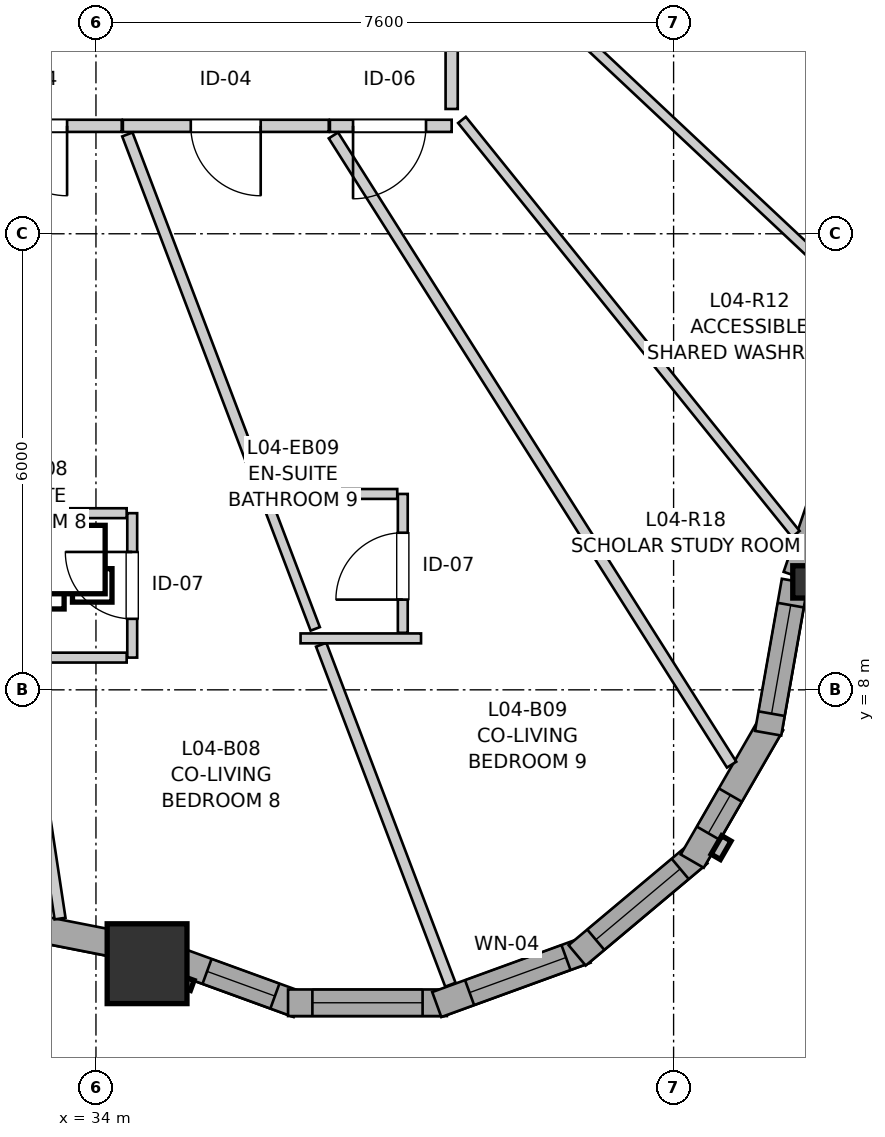
"""IFC4 building model, lengths in metres.
Left out: names, types, materials, properties, quantities, classifications, styles, units other than length and angle.
Written with IfcOpenShell. Run it as: python <this file> out.ifc"""

import sys

from ifc_helpers import new_model, si_unit, direction, frame, frame_2d, origin, origin_2d, place, context, subcontext, project, spatial, rectangle, i_section, extrude, source, transform, mapped, element, fill, save


model = new_model("IFC4")
c1 = context("Model", 3, precision=1e-05, world=origin(), true_north=direction((0.0, 1.0)))
c2 = subcontext(c1, "Body", "Model", "MODEL_VIEW")
j1 = project(units=[si_unit("LENGTHUNIT", "METRE"), si_unit("PLANEANGLEUNIT", "RADIAN")], contexts=[c1])
p1 = place(None, origin())
s1 = spatial("IfcSite", under=j1, at=p1, CompositionType="ELEMENT")
p2 = place(p1, origin())
s2 = spatial("IfcBuilding", under=s1, at=p2, CompositionType="ELEMENT")
p3 = place(p2, frame((0.0, 0.0, 17.4)))
s3 = spatial("IfcBuildingStorey", under=s2, at=p3, CompositionType="ELEMENT", Elevation=17.4)
m1 = source(origin(), c2, "Body", "SweptSolid", [
    extrude(rectangle(XDim=1.05, YDim=1.05, at=origin_2d()), origin(), (0.0, 0.0, 1.0), 2.94),
])
p4 = place(p3, frame((34.673, 4.397, 0.0), z_axis=(0.0, 0.0, 1.0), x_axis=(1.0, 0.0, 0.0)))
e1 = element("IfcColumn", 1, at=p4, inside=s3, PredefinedType="COLUMN", context=c2, shape_type="MappedRepresentation", body=[
    mapped(m1, transform((0.0, 0.0, 0.0), x_axis=(1.0, 0.0, 0.0), y_axis=(0.0, 1.0, 0.0), z_axis=(0.0, 0.0, 1.0), scale=1.0)),
])
m2 = source(origin(), c2, "Body", "SweptSolid", [
    extrude(i_section(OverallWidth=0.409, OverallDepth=0.425, WebThickness=0.03, FlangeThickness=0.048, FilletRadius=0.015, at=origin_2d()), origin(), (0.0, 0.0, 1.0), 2.94),
])
p5 = place(p3, frame((43.373, 9.42, 0.0), z_axis=(0.0, 0.0, 1.0), x_axis=(1.0, 0.0, 0.0)))
e2 = element("IfcColumn", 2, at=p5, inside=s3, PredefinedType="PILASTER", context=c2, shape_type="MappedRepresentation", body=[
    mapped(m2, transform((0.0, 0.0, 0.0), x_axis=(1.0, 0.0, 0.0), y_axis=(0.0, 1.0, 0.0), z_axis=(0.0, 0.0, 1.0), scale=1.0)),
])
p6 = place(p3, frame((31.23, 5.252, 0.0), z_axis=(0.0, 0.0, 1.0), x_axis=(0.981232542219, -0.192828156892, 0.0)))
e3 = element("IfcWall", 3, at=p6, inside=s3, PredefinedType="SOLIDWALL", context=c2, shape_type="SweptSolid", body=[
    extrude(rectangle(XDim=3.242, YDim=0.35, at=frame_2d((1.621, 0.0))), origin(), (0.0, 0.0, 1.0), 2.42),
])
p7 = place(p6, frame((0.471, 0.0, 0.82)))
e4 = element("IfcOpeningElement", 4, at=p7, cuts=e3, PredefinedType="OPENING", context=c2, shape_type="SweptSolid", body=[
    extrude(rectangle(XDim=1.45, YDim=1.25, at=frame_2d((0.725, 0.625))), frame((0.0, 0.185, 0.0), z_axis=(0.0, -1.0, 0.0), x_axis=(1.0, 0.0, 0.0)), (0.0, 0.0, 1.0), 0.37),
])
p8 = place(p3, frame((35.014, 4.459, 0.0), z_axis=(0.0, 0.0, 1.0), x_axis=(0.939720171257, -0.341944439541, 0.0)))
e5 = element("IfcWall", 5, at=p8, inside=s3, PredefinedType="SOLIDWALL", context=c2, shape_type="SweptSolid", body=[
    extrude(rectangle(XDim=1.752, YDim=0.35, at=frame_2d((0.876, 0.0))), origin(), (0.0, 0.0, 1.0), 2.42),
])
p9 = place(p8, frame((0.476, 0.0, 0.82)))
e6 = element("IfcOpeningElement", 6, at=p9, cuts=e5, PredefinedType="OPENING", context=c2, shape_type="SweptSolid", body=[
    extrude(rectangle(XDim=0.95, YDim=1.35, at=frame_2d((0.475, 0.675))), frame((0.0, 0.185, 0.0), z_axis=(0.0, -1.0, 0.0), x_axis=(1.0, 0.0, 0.0)), (0.0, 0.0, 1.0), 0.37),
])
p10 = place(p3, frame((36.527, 3.883, 0.0), z_axis=(0.0, 0.0, 1.0), x_axis=(1.0, 0.0, 0.0)))
e7 = element("IfcWall", 7, at=p10, inside=s3, PredefinedType="SOLIDWALL", context=c2, shape_type="SweptSolid", body=[
    extrude(rectangle(XDim=2.09, YDim=0.35, at=frame_2d((1.045, 0.0))), origin(), (0.0, 0.0, 1.0), 2.42),
])
p11 = place(p10, frame((0.32, 0.0, 0.82)))
e8 = element("IfcOpeningElement", 8, at=p11, cuts=e7, PredefinedType="OPENING", context=c2, shape_type="SweptSolid", body=[
    extrude(rectangle(XDim=1.45, YDim=1.25, at=frame_2d((0.725, 0.625))), frame((0.0, 0.185, 0.0), z_axis=(0.0, -1.0, 0.0), x_axis=(1.0, 0.0, 0.0)), (0.0, 0.0, 1.0), 0.37),
])
p12 = place(p3, frame((38.484, 3.86, 0.0), z_axis=(0.0, 0.0, 1.0), x_axis=(0.939711556618, 0.341968113072, 0.0)))
e9 = element("IfcWall", 9, at=p12, inside=s3, PredefinedType="SOLIDWALL", context=c2, shape_type="SweptSolid", body=[
    extrude(rectangle(XDim=2.09, YDim=0.35, at=frame_2d((1.045, 0.0))), origin(), (0.0, 0.0, 1.0), 2.42),
])
p13 = place(p12, frame((0.459, 0.0, 0.82)))
e10 = element("IfcOpeningElement", 10, at=p13, cuts=e9, PredefinedType="OPENING", context=c2, shape_type="SweptSolid", body=[
    extrude(rectangle(XDim=1.35, YDim=1.45, at=frame_2d((0.675, 0.725))), frame((0.0, 0.185, 0.0), z_axis=(0.0, -1.0, 0.0), x_axis=(1.0, 0.0, 0.0)), (0.0, 0.0, 1.0), 0.37),
])
p14 = place(p3, frame((40.331, 4.507, 0.0), z_axis=(0.0, 0.0, 1.0), x_axis=(0.766024572719, 0.642811289563, 0.0)))
e11 = element("IfcWall", 11, at=p14, inside=s3, PredefinedType="SOLIDWALL", context=c2, shape_type="SweptSolid", body=[
    extrude(rectangle(XDim=2.09, YDim=0.35, at=frame_2d((1.045, 0.0))), origin(), (0.0, 0.0, 1.0), 2.42),
])
p15 = place(p14, frame((0.32, 0.0, 0.82)))
e12 = element("IfcOpeningElement", 12, at=p15, cuts=e11, PredefinedType="OPENING", context=c2, shape_type="SweptSolid", body=[
    extrude(rectangle(XDim=1.45, YDim=1.25, at=frame_2d((0.725, 0.625))), frame((0.0, 0.185, 0.0), z_axis=(0.0, -1.0, 0.0), x_axis=(1.0, 0.0, 0.0)), (0.0, 0.0, 1.0), 0.37),
])
p16 = place(p3, frame((41.845, 5.746, 0.0), z_axis=(0.0, 0.0, 1.0), x_axis=(0.499995423472, 0.866028046028, 0.0)))
e13 = element("IfcWall", 13, at=p16, inside=s3, PredefinedType="SOLIDWALL", context=c2, shape_type="SweptSolid", body=[
    extrude(rectangle(XDim=2.09, YDim=0.35, at=frame_2d((1.045, 0.0))), origin(), (0.0, 0.0, 1.0), 2.42),
])
p17 = place(p16, frame((0.424, 0.0, 0.82)))
e14 = element("IfcOpeningElement", 14, at=p17, cuts=e13, PredefinedType="OPENING", context=c2, shape_type="SweptSolid", body=[
    extrude(rectangle(XDim=0.58, YDim=1.35, at=frame_2d((0.29, 0.675))), frame((0.0, 0.185, 0.0), z_axis=(0.0, -1.0, 0.0), x_axis=(1.0, 0.0, 0.0)), (0.0, 0.0, 1.0), 0.37),
])
p18 = place(p3, frame((42.844, 7.429, 0.0), z_axis=(0.0, 0.0, 1.0), x_axis=(0.17370309897, 0.984798067326, 0.0)))
e15 = element("IfcWall", 15, at=p18, inside=s3, PredefinedType="SOLIDWALL", context=c2, shape_type="SweptSolid", body=[
    extrude(rectangle(XDim=2.032, YDim=0.35, at=frame_2d((1.016, 0.0))), origin(), (0.0, 0.0, 1.0), 2.42),
])
p19 = place(p18, frame((0.261, 0.0, 0.82)))
e16 = element("IfcOpeningElement", 16, at=p19, cuts=e15, PredefinedType="OPENING", context=c2, shape_type="SweptSolid", body=[
    extrude(rectangle(XDim=1.45, YDim=1.25, at=frame_2d((0.725, 0.625))), frame((0.0, 0.185, 0.0), z_axis=(0.0, -1.0, 0.0), x_axis=(1.0, 0.0, 0.0)), (0.0, 0.0, 1.0), 0.37),
])
p20 = place(p3, frame((43.213, 9.496, 0.0), z_axis=(0.0, 0.0, 1.0), x_axis=(0.323599506414, 0.946194144692, 0.0)))
e17 = element("IfcWall", 17, at=p20, inside=s3, PredefinedType="SOLIDWALL", context=c2, shape_type="SweptSolid", body=[
    extrude(rectangle(XDim=3.522, YDim=0.35, at=frame_2d((1.761, 0.0))), origin(), (0.0, 0.0, 1.0), 2.42),
])
p21 = place(p20, frame((1.351, 0.0, 0.82)))
e18 = element("IfcOpeningElement", 18, at=p21, cuts=e17, PredefinedType="OPENING", context=c2, shape_type="SweptSolid", body=[
    extrude(rectangle(XDim=1.25, YDim=1.35, at=frame_2d((0.625, 0.675))), frame((0.0, 0.185, 0.0), z_axis=(0.0, -1.0, 0.0), x_axis=(1.0, 0.0, 0.0)), (0.0, 0.0, 1.0), 0.37),
])
p22 = place(p3, frame((37.063, 15.42, 0.0), z_axis=(0.0, 0.0, 1.0), x_axis=(-1.0, 0.0, 0.0)))
e19 = element("IfcWall", 19, at=p22, inside=s3, PredefinedType="PARTITIONING", context=c2, shape_type="SweptSolid", body=[
    extrude(rectangle(XDim=2.709, YDim=0.16, at=frame_2d((1.354, 0.0))), origin(), (0.0, 0.0, 1.0), 2.94),
])
p23 = place(p22, frame((0.896, 0.0, 0.0)))
e20 = element("IfcOpeningElement", 20, at=p23, cuts=e19, PredefinedType="OPENING", context=c2, shape_type="SweptSolid", body=[
    extrude(rectangle(XDim=0.92, YDim=2.1, at=frame_2d((0.46, 1.05))), frame((0.0, 0.09, 0.0), z_axis=(0.0, -1.0, 0.0), x_axis=(1.0, 0.0, 0.0)), (0.0, 0.0, 1.0), 0.18),
])
p24 = place(p3, frame((38.68, 18.147, 0.0), z_axis=(0.0, 0.0, 1.0), x_axis=(0.0, -1.0, 0.0)))
e21 = element("IfcWall", 21, at=p24, inside=s3, PredefinedType="PARTITIONING", context=c2, shape_type="SweptSolid", body=[
    extrude(rectangle(XDim=2.505, YDim=0.16, at=frame_2d((1.252, 0.0))), origin(), (0.0, 0.0, 1.0), 2.94),
])
p25 = place(p24, frame((0.748, 0.0, 0.0)))
e22 = element("IfcOpeningElement", 22, at=p25, cuts=e21, PredefinedType="OPENING", context=c2, shape_type="SweptSolid", body=[
    extrude(rectangle(XDim=0.95, YDim=2.1, at=frame_2d((0.475, 1.05))), frame((0.0, 0.09, 0.0), z_axis=(0.0, -1.0, 0.0), x_axis=(1.0, 0.0, 0.0)), (0.0, 0.0, 1.0), 0.18),
])
p26 = place(p3, frame((34.339, 15.42, 0.0), z_axis=(0.0, 0.0, 1.0), x_axis=(-1.0, 0.0, 0.0)))
e23 = element("IfcWall", 23, at=p26, inside=s3, PredefinedType="PARTITIONING", context=c2, shape_type="SweptSolid", body=[
    extrude(rectangle(XDim=2.359, YDim=0.16, at=frame_2d((1.18, 0.0))), origin(), (0.0, 0.0, 1.0), 2.94),
])
p27 = place(p26, frame((0.719, 0.0, 0.0)))
e24 = element("IfcOpeningElement", 24, at=p27, cuts=e23, PredefinedType="OPENING", context=c2, shape_type="SweptSolid", body=[
    extrude(rectangle(XDim=0.92, YDim=2.1, at=frame_2d((0.46, 1.05))), frame((0.0, 0.09, 0.0), z_axis=(0.0, -1.0, 0.0), x_axis=(1.0, 0.0, 0.0)), (0.0, 0.0, 1.0), 0.18),
])
p28 = place(p3, frame((34.477, 8.424, 0.0), z_axis=(0.0, 0.0, 1.0), x_axis=(0.0, 1.0, 0.0)))
e25 = element("IfcWall", 25, at=p28, inside=s3, PredefinedType="PARTITIONING", context=c2, shape_type="SweptSolid", body=[
    extrude(rectangle(XDim=1.9, YDim=0.13, at=frame_2d((0.95, 0.0))), origin(), (0.0, 0.0, 1.0), 2.94),
])
p29 = place(p28, frame((0.51, 0.0, 0.0)))
e26 = element("IfcOpeningElement", 26, at=p29, cuts=e25, PredefinedType="OPENING", context=c2, shape_type="SweptSolid", body=[
    extrude(rectangle(XDim=0.88, YDim=2.05, at=frame_2d((0.44, 1.025))), frame((0.0, 0.075, 0.0), z_axis=(0.0, -1.0, 0.0), x_axis=(1.0, 0.0, 0.0)), (0.0, 0.0, 1.0), 0.15),
])
p30 = place(p3, frame((38.037, 8.75, 0.0), z_axis=(0.0, 0.0, 1.0), x_axis=(0.0, 1.0, 0.0)))
e27 = element("IfcWall", 27, at=p30, inside=s3, PredefinedType="PARTITIONING", context=c2, shape_type="SweptSolid", body=[
    extrude(rectangle(XDim=1.827, YDim=0.13, at=frame_2d((0.914, 0.0))), origin(), (0.0, 0.0, 1.0), 2.94),
])
p31 = place(p30, frame((0.437, 0.0, 0.0)))
e28 = element("IfcOpeningElement", 28, at=p31, cuts=e27, PredefinedType="OPENING", context=c2, shape_type="SweptSolid", body=[
    extrude(rectangle(XDim=0.88, YDim=2.05, at=frame_2d((0.44, 1.025))), frame((0.0, 0.075, 0.0), z_axis=(0.0, -1.0, 0.0), x_axis=(1.0, 0.0, 0.0)), (0.0, 0.0, 1.0), 0.15),
])
p32 = place(p3, frame((38.68, 15.42, 0.0), z_axis=(0.0, 0.0, 1.0), x_axis=(-1.0, 0.0, 0.0)))
e29 = element("IfcWall", 29, at=p32, inside=s3, PredefinedType="PARTITIONING", context=c2, shape_type="SweptSolid", body=[
    extrude(rectangle(XDim=1.602, YDim=0.16, at=frame_2d((0.801, 0.0))), origin(), (0.0, 0.0, 1.0), 2.94),
])
p33 = place(p32, frame((0.337, 0.0, 0.0)))
e30 = element("IfcOpeningElement", 30, at=p33, cuts=e29, PredefinedType="OPENING", context=c2, shape_type="SweptSolid", body=[
    extrude(rectangle(XDim=0.96, YDim=2.1, at=frame_2d((0.48, 1.05))), frame((0.0, 0.09, 0.0), z_axis=(0.0, -1.0, 0.0), x_axis=(1.0, 0.0, 0.0)), (0.0, 0.0, 1.0), 0.18),
])
p34 = place(p3, frame((37.125, 15.294, 0.0), z_axis=(0.0, 0.0, 1.0), x_axis=(0.534743765269, -0.845014263492, 0.0)))
e31 = element("IfcWall", 31, at=p34, inside=s3, PredefinedType="PARTITIONING", context=c2, shape_type="SweptSolid", body=[
    extrude(rectangle(XDim=9.797, YDim=0.145, at=frame_2d((4.899, 0.0))), origin(), (0.0, 0.0, 1.0), 2.94),
])
p35 = place(p3, frame((38.81, 18.061, 0.0), z_axis=(0.0, 0.0, 1.0), x_axis=(0.729196389153, -0.684304483433, 0.0)))
e32 = element("IfcWall", 32, at=p35, inside=s3, PredefinedType="PARTITIONING", context=c2, shape_type="SweptSolid", body=[
    extrude(rectangle(XDim=7.396, YDim=0.13, at=frame_2d((3.698, 0.0))), origin(), (0.0, 0.0, 1.0), 2.94),
])
p36 = place(p3, frame((38.816, 15.498, 0.0), z_axis=(0.0, 0.0, 1.0), x_axis=(0.627528755525, -0.778593386171, 0.0)))
e33 = element("IfcWall", 33, at=p36, inside=s3, PredefinedType="PARTITIONING", context=c2, shape_type="SweptSolid", body=[
    extrude(rectangle(XDim=6.998, YDim=0.13, at=frame_2d((3.499, 0.0))), origin(), (0.0, 0.0, 1.0), 2.94),
])
p37 = place(p3, frame((34.413, 15.307, 0.0), z_axis=(0.0, 0.0, 1.0), x_axis=(0.355171610573, -0.934801116304, 0.0)))
e34 = element("IfcWall", 34, at=p37, inside=s3, PredefinedType="PARTITIONING", context=c2, shape_type="SweptSolid", body=[
    extrude(rectangle(XDim=5.177, YDim=0.145, at=frame_2d((2.589, 0.0))), origin(), (0.0, 0.0, 1.0), 2.94),
])
p38 = place(p3, frame((36.963, 8.594, 0.0), z_axis=(0.0, 0.0, 1.0), x_axis=(0.35524629266, -0.934772737916, 0.0)))
e35 = element("IfcWall", 35, at=p38, inside=s3, PredefinedType="PARTITIONING", context=c2, shape_type="SweptSolid", body=[
    extrude(rectangle(XDim=4.785, YDim=0.145, at=frame_2d((2.393, 0.0))), origin(), (0.0, 0.0, 1.0), 2.94),
])
p39 = place(p3, frame((33.006, 8.439, 0.0), z_axis=(0.0, 0.0, 1.0), x_axis=(0.149510938207, -0.988760071684, 0.0)))
e36 = element("IfcWall", 36, at=p39, inside=s3, PredefinedType="PARTITIONING", context=c2, shape_type="SweptSolid", body=[
    extrude(rectangle(XDim=3.488, YDim=0.145, at=frame_2d((1.744, 0.0))), origin(), (0.0, 0.0, 1.0), 2.94),
])
p40 = place(p3, frame((36.257, 10.453, 0.0), z_axis=(0.0, 0.0, 1.0), x_axis=(0.355345777079, -0.934734924303, 0.0)))
e37 = element("IfcWall", 37, at=p40, inside=s3, PredefinedType="PARTITIONING", context=c2, shape_type="SweptSolid", body=[
    extrude(rectangle(XDim=1.766, YDim=0.13, at=frame_2d((0.883, 0.0))), origin(), (0.0, 0.0, 1.0), 2.94),
])
p41 = place(p3, frame((36.347, 10.577, 0.0), z_axis=(0.0, 0.0, 1.0), x_axis=(1.0, 0.0, 0.0)))
e38 = element("IfcWall", 38, at=p41, inside=s3, PredefinedType="PARTITIONING", context=c2, shape_type="SweptSolid", body=[
    extrude(rectangle(XDim=1.617, YDim=0.13, at=frame_2d((0.808, 0.0))), origin(), (0.0, 0.0, 1.0), 2.94),
])
p42 = place(p3, frame((32.812, 10.324, 0.0), z_axis=(0.0, 0.0, 1.0), x_axis=(1.0, 0.0, 0.0)))
e39 = element("IfcWall", 39, at=p42, inside=s3, PredefinedType="PARTITIONING", context=c2, shape_type="SweptSolid", body=[
    extrude(rectangle(XDim=1.592, YDim=0.13, at=frame_2d((0.796, 0.0))), origin(), (0.0, 0.0, 1.0), 2.94),
])
p43 = place(p3, frame((33.099, 8.424, 0.0), z_axis=(0.0, 0.0, 1.0), x_axis=(1.0, 0.0, 0.0)))
e40 = element("IfcWall", 40, at=p43, inside=s3, PredefinedType="PARTITIONING", context=c2, shape_type="SweptSolid", body=[
    extrude(rectangle(XDim=1.305, YDim=0.13, at=frame_2d((0.652, 0.0))), origin(), (0.0, 0.0, 1.0), 2.508),
])
p44 = place(p3, frame((36.692, 8.677, 0.0), z_axis=(0.0, 0.0, 1.0), x_axis=(1.0, 0.0, 0.0)))
e41 = element("IfcWall", 41, at=p44, inside=s3, PredefinedType="PARTITIONING", context=c2, shape_type="SweptSolid", body=[
    extrude(rectangle(XDim=1.585, YDim=0.13, at=frame_2d((0.792, 0.0))), origin(), (0.0, 0.0, 1.0), 2.94),
])
m3 = source(origin(), c2, "Body", "SweptSolid", [
    extrude(rectangle(XDim=0.95, YDim=1.35, at=frame_2d((0.475, 0.675))), frame((0.0, 0.03, 0.0), z_axis=(0.0, -1.0, 0.0), x_axis=(1.0, 0.0, 0.0)), (0.0, 0.0, 1.0), 0.06),
])
p45 = place(p9, origin())
e42 = element("IfcWindow", 42, at=p45, inside=s3, PartitioningType="SINGLE_PANEL", PredefinedType="WINDOW", context=c2, shape_type="MappedRepresentation", body=[
    mapped(m3, transform((0.0, 0.0, 0.0), x_axis=(1.0, 0.0, 0.0), y_axis=(0.0, 1.0, 0.0), z_axis=(0.0, 0.0, 1.0), scale=1.0)),
])
fill(e6, e42)
m4 = source(origin(), c2, "Body", "SweptSolid", [
    extrude(rectangle(XDim=1.45, YDim=1.25, at=frame_2d((0.725, 0.625))), frame((0.0, 0.03, 0.0), z_axis=(0.0, -1.0, 0.0), x_axis=(1.0, 0.0, 0.0)), (0.0, 0.0, 1.0), 0.06),
])
p46 = place(p11, origin())
e43 = element("IfcWindow", 43, at=p46, inside=s3, PartitioningType="SINGLE_PANEL", PredefinedType="WINDOW", context=c2, shape_type="MappedRepresentation", body=[
    mapped(m4, transform((0.0, 0.0, 0.0), x_axis=(1.0, 0.0, 0.0), y_axis=(0.0, 1.0, 0.0), z_axis=(0.0, 0.0, 1.0), scale=1.0)),
])
fill(e8, e43)
m5 = source(origin(), c2, "Body", "SweptSolid", [
    extrude(rectangle(XDim=1.35, YDim=1.45, at=frame_2d((0.675, 0.725))), frame((0.0, 0.03, 0.0), z_axis=(0.0, -1.0, 0.0), x_axis=(1.0, 0.0, 0.0)), (0.0, 0.0, 1.0), 0.06),
])
p47 = place(p13, origin())
e44 = element("IfcWindow", 44, at=p47, inside=s3, PartitioningType="SINGLE_PANEL", PredefinedType="WINDOW", context=c2, shape_type="MappedRepresentation", body=[
    mapped(m5, transform((0.0, 0.0, 0.0), x_axis=(1.0, 0.0, 0.0), y_axis=(0.0, 1.0, 0.0), z_axis=(0.0, 0.0, 1.0), scale=1.0)),
])
fill(e10, e44)
p48 = place(p15, origin())
e45 = element("IfcWindow", 45, at=p48, inside=s3, PartitioningType="SINGLE_PANEL", PredefinedType="WINDOW", context=c2, shape_type="MappedRepresentation", body=[
    mapped(m4, transform((0.0, 0.0, 0.0), x_axis=(1.0, 0.0, 0.0), y_axis=(0.0, 1.0, 0.0), z_axis=(0.0, 0.0, 1.0), scale=1.0)),
])
fill(e12, e45)
m6 = source(origin(), c2, "Body", "SweptSolid", [
    extrude(rectangle(XDim=0.58, YDim=1.35, at=frame_2d((0.29, 0.675))), frame((0.0, 0.03, 0.0), z_axis=(0.0, -1.0, 0.0), x_axis=(1.0, 0.0, 0.0)), (0.0, 0.0, 1.0), 0.06),
])
p49 = place(p17, origin())
e46 = element("IfcWindow", 46, at=p49, inside=s3, PartitioningType="SINGLE_PANEL", PredefinedType="WINDOW", context=c2, shape_type="MappedRepresentation", body=[
    mapped(m6, transform((0.0, 0.0, 0.0), x_axis=(1.0, 0.0, 0.0), y_axis=(0.0, 1.0, 0.0), z_axis=(0.0, 0.0, 1.0), scale=1.0)),
])
fill(e14, e46)
p50 = place(p19, origin())
e47 = element("IfcWindow", 47, at=p50, inside=s3, PartitioningType="SINGLE_PANEL", PredefinedType="WINDOW", context=c2, shape_type="MappedRepresentation", body=[
    mapped(m4, transform((0.0, 0.0, 0.0), x_axis=(1.0, 0.0, 0.0), y_axis=(0.0, 1.0, 0.0), z_axis=(0.0, 0.0, 1.0), scale=1.0)),
])
fill(e16, e47)
m7 = source(origin(), c2, "Body", "SweptSolid", [
    extrude(rectangle(XDim=0.92, YDim=2.1, at=frame_2d((0.46, 1.05))), frame((0.0, 0.025, 0.0), z_axis=(0.0, -1.0, 0.0), x_axis=(1.0, 0.0, 0.0)), (0.0, 0.0, 1.0), 0.05),
])
p51 = place(p23, origin())
e48 = element("IfcDoor", 48, at=p51, inside=s3, OperationType="SINGLE_SWING_LEFT", PredefinedType="DOOR", context=c2, shape_type="MappedRepresentation", body=[
    mapped(m7, transform((0.0, 0.0, 0.0), x_axis=(1.0, 0.0, 0.0), y_axis=(0.0, 1.0, 0.0), z_axis=(0.0, 0.0, 1.0), scale=1.0)),
])
fill(e20, e48)
p52 = place(p27, origin())
e49 = element("IfcDoor", 49, at=p52, inside=s3, OperationType="SINGLE_SWING_LEFT", PredefinedType="DOOR", context=c2, shape_type="MappedRepresentation", body=[
    mapped(m7, transform((0.0, 0.0, 0.0), x_axis=(1.0, 0.0, 0.0), y_axis=(0.0, 1.0, 0.0), z_axis=(0.0, 0.0, 1.0), scale=1.0)),
])
fill(e24, e49)
m8 = source(origin(), c2, "Body", "SweptSolid", [
    extrude(rectangle(XDim=0.88, YDim=2.05, at=frame_2d((0.44, 1.025))), frame((0.0, 0.025, 0.0), z_axis=(0.0, -1.0, 0.0), x_axis=(1.0, 0.0, 0.0)), (0.0, 0.0, 1.0), 0.05),
])
p53 = place(p29, origin())
e50 = element("IfcDoor", 50, at=p53, inside=s3, OperationType="SINGLE_SWING_RIGHT", PredefinedType="DOOR", context=c2, shape_type="MappedRepresentation", body=[
    mapped(m8, transform((0.0, 0.0, 0.0), x_axis=(1.0, 0.0, 0.0), y_axis=(0.0, 1.0, 0.0), z_axis=(0.0, 0.0, 1.0), scale=1.0)),
])
fill(e26, e50)
p54 = place(p31, origin())
e51 = element("IfcDoor", 51, at=p54, inside=s3, OperationType="SINGLE_SWING_LEFT", PredefinedType="DOOR", context=c2, shape_type="MappedRepresentation", body=[
    mapped(m8, transform((0.0, 0.0, 0.0), x_axis=(1.0, 0.0, 0.0), y_axis=(0.0, 1.0, 0.0), z_axis=(0.0, 0.0, 1.0), scale=1.0)),
])
fill(e28, e51)
m9 = source(origin(), c2, "Body", "SweptSolid", [
    extrude(rectangle(XDim=0.96, YDim=2.1, at=frame_2d((0.48, 1.05))), frame((0.0, 0.025, 0.0), z_axis=(0.0, -1.0, 0.0), x_axis=(1.0, 0.0, 0.0)), (0.0, 0.0, 1.0), 0.05),
])
p55 = place(p33, origin())
e52 = element("IfcDoor", 52, at=p55, inside=s3, OperationType="SINGLE_SWING_RIGHT", PredefinedType="DOOR", context=c2, shape_type="MappedRepresentation", body=[
    mapped(m9, transform((0.0, 0.0, 0.0), x_axis=(1.0, 0.0, 0.0), y_axis=(0.0, 1.0, 0.0), z_axis=(0.0, 0.0, 1.0), scale=1.0)),
])
fill(e30, e52)
save(model, sys.argv[1])
